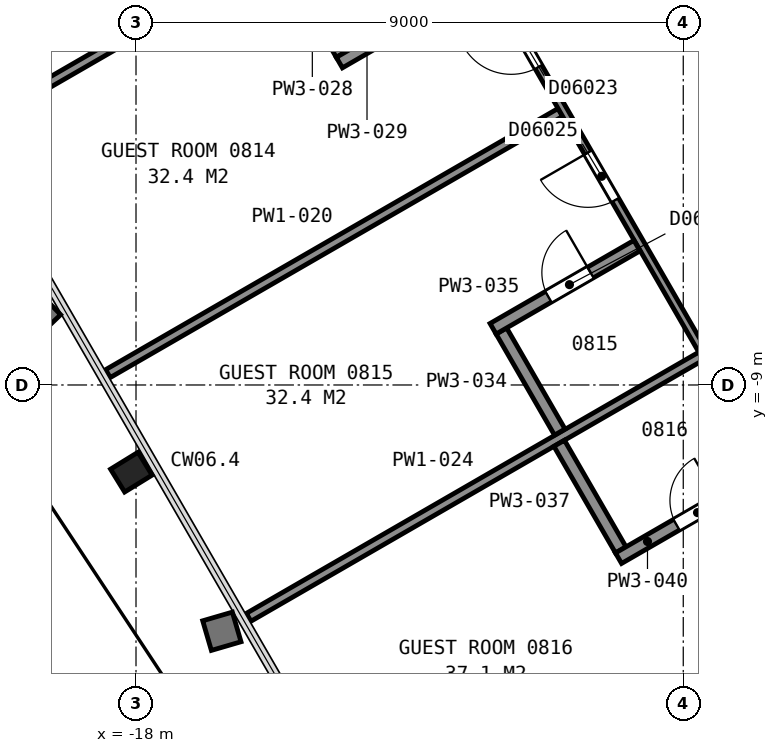
"""IFC4 building model, lengths in metres.
Left out: names, types, materials, properties, quantities, classifications, styles, units other than length and angle.
Written with IfcOpenShell. Run it as: python <this file> out.ifc"""

import sys

from ifc_helpers import new_model, si_unit, direction, frame, frame_2d, origin, origin_2d, place, context, subcontext, project, spatial, rectangle, i_section, extrude, element, fill, save


model = new_model("IFC4")
c1 = context("Model", 3, precision=1e-05, world=origin(), true_north=direction((0.0, 1.0)))
c2 = subcontext(c1, "Body", "Model", "MODEL_VIEW")
j1 = project(units=[si_unit("LENGTHUNIT", "METRE"), si_unit("PLANEANGLEUNIT", "RADIAN")], contexts=[c1])
p1 = place(None, origin())
s1 = spatial("IfcSite", under=j1, at=p1, CompositionType="ELEMENT")
p2 = place(p1, origin())
s2 = spatial("IfcBuilding", under=s1, at=p2, CompositionType="ELEMENT")
p3 = place(p2, frame((0.0, 0.0, 44.0)))
s3 = spatial("IfcBuildingStorey", under=s2, at=p3, CompositionType="ELEMENT", Elevation=44.0)
p4 = place(p3, frame((-17.992, -10.381, 0.025), z_axis=(-0.072019656871, -0.044267077392, 0.99642039064), x_axis=(-0.499538231107, 0.866288572712, 0.002380010802)))
e1 = element("IfcColumn", 1, at=p4, inside=s3, PredefinedType="COLUMN", context=c2, shape_type="SweptSolid", body=[
    extrude(i_section(OverallWidth=0.442, OverallDepth=0.531, WebThickness=0.066, FlangeThickness=0.106, FilletRadius=0.015, at=origin_2d()), origin(), (0.0, 0.0, 1.0), 3.563),
])
p5 = place(p3, frame((-13.664, 5.946, 0.0), z_axis=(0.0, 0.0, 1.0), x_axis=(0.499994327219, -0.866028678941, 0.0)))
e2 = element("IfcWall", 2, at=p5, inside=s3, PredefinedType="PARTITIONING", context=c2, shape_type="SweptSolid", body=[
    extrude(rectangle(XDim=23.968, YDim=0.2, at=frame_2d((11.984, 0.0))), origin(), (0.0, 0.0, 1.0), 3.35),
])
p6 = place(p3, frame((-20.775, -4.806, 0.0), z_axis=(0.0, 0.0, 1.0), x_axis=(0.865995804368, 0.50005126419, 0.0)))
e3 = element("IfcWall", 3, at=p6, inside=s3, PredefinedType="PARTITIONING", context=c2, shape_type="SweptSolid", body=[
    extrude(rectangle(XDim=8.591, YDim=0.15, at=frame_2d((4.295, 0.0))), origin(), (0.0, 0.0, 1.0), 2.613),
])
p7 = place(p3, frame((-18.462, -8.813, 0.0), z_axis=(0.0, 0.0, 1.0), x_axis=(0.866029425019, 0.499993034952, 0.0)))
e4 = element("IfcWall", 4, at=p7, inside=s3, PredefinedType="PARTITIONING", context=c2, shape_type="SweptSolid", body=[
    extrude(rectangle(XDim=8.591, YDim=0.15, at=frame_2d((4.296, 0.0))), origin(), (0.0, 0.0, 1.0), 2.613),
])
p8 = place(p3, frame((-3.766, -16.958, 0.0), z_axis=(0.0, 0.0, 1.0), x_axis=(-0.500024758804, 0.866011108811, 0.0)))
e5 = element("IfcWall", 5, at=p8, inside=s3, PredefinedType="PARTITIONING", context=c2, shape_type="SweptSolid", body=[
    extrude(rectangle(XDim=26.402, YDim=0.125, at=frame_2d((13.201, 0.0))), origin(), (0.0, 0.0, 1.0), 2.613),
])
p9 = place(p8, frame((25.139, 0.0, 0.0)))
e6 = element("IfcOpeningElement", 6, at=p9, cuts=e5, PredefinedType="OPENING", context=c2, shape_type="SweptSolid", body=[
    extrude(rectangle(XDim=0.9, YDim=2.1, at=frame_2d((0.45, 1.05))), frame((0.0, 0.073, 0.0), z_axis=(0.0, -1.0, 0.0), x_axis=(1.0, 0.0, 0.0)), (0.0, 0.0, 1.0), 0.145),
])
p10 = place(p8, frame((22.963, 0.0, 0.0)))
e7 = element("IfcOpeningElement", 7, at=p10, cuts=e5, PredefinedType="OPENING", context=c2, shape_type="SweptSolid", body=[
    extrude(rectangle(XDim=1.0, YDim=2.1, at=frame_2d((0.5, 1.05))), frame((0.0, 0.073, 0.0), z_axis=(0.0, -1.0, 0.0), x_axis=(1.0, 0.0, 0.0)), (0.0, 0.0, 1.0), 0.145),
])
p11 = place(p8, frame((15.228, 0.0, 0.0)))
e8 = element("IfcOpeningElement", 8, at=p11, cuts=e5, PredefinedType="OPENING", context=c2, shape_type="SweptSolid", body=[
    extrude(rectangle(XDim=0.9, YDim=2.1, at=frame_2d((0.45, 1.05))), frame((0.0, 0.073, 0.0), z_axis=(0.0, -1.0, 0.0), x_axis=(1.0, 0.0, 0.0)), (0.0, 0.0, 1.0), 0.145),
])
p12 = place(p8, frame((12.702, 0.0, 0.0)))
e9 = element("IfcOpeningElement", 9, at=p12, cuts=e5, PredefinedType="OPENING", context=c2, shape_type="SweptSolid", body=[
    extrude(rectangle(XDim=0.9, YDim=2.1, at=frame_2d((0.45, 1.05))), frame((0.0, 0.073, 0.0), z_axis=(0.0, -1.0, 0.0), x_axis=(1.0, 0.0, 0.0)), (0.0, 0.0, 1.0), 0.145),
])
p13 = place(p8, frame((5.624, 0.0, 0.0)))
e10 = element("IfcOpeningElement", 10, at=p13, cuts=e5, PredefinedType="OPENING", context=c2, shape_type="SweptSolid", body=[
    extrude(rectangle(XDim=0.9, YDim=2.1, at=frame_2d((0.45, 1.05))), frame((0.0, 0.073, 0.0), z_axis=(0.0, -1.0, 0.0), x_axis=(1.0, 0.0, 0.0)), (0.0, 0.0, 1.0), 0.145),
])
p14 = place(p8, frame((2.843, 0.0, 0.0)))
e11 = element("IfcOpeningElement", 11, at=p14, cuts=e5, PredefinedType="OPENING", context=c2, shape_type="SweptSolid", body=[
    extrude(rectangle(XDim=0.9, YDim=2.1, at=frame_2d((0.45, 1.05))), frame((0.0, 0.073, 0.0), z_axis=(0.0, -1.0, 0.0), x_axis=(1.0, 0.0, 0.0)), (0.0, 0.0, 1.0), 0.145),
])
p15 = place(p3, frame((-16.148, -12.821, 0.0), z_axis=(0.0, 0.0, 1.0), x_axis=(0.866036528751, 0.499980730498, 0.0)))
e12 = element("IfcWall", 12, at=p15, inside=s3, PredefinedType="PARTITIONING", context=c2, shape_type="SweptSolid", body=[
    extrude(rectangle(XDim=8.592, YDim=0.15, at=frame_2d((4.296, 0.0))), origin(), (0.0, 0.0, 1.0), 2.613),
])
p16 = place(p3, frame((-15.582, -1.894, 0.0), z_axis=(0.0, 0.0, 1.0), x_axis=(0.500026156197, -0.86601030197, 0.0)))
e13 = element("IfcWall", 13, at=p16, inside=s3, PredefinedType="PARTITIONING", context=c2, shape_type="SweptSolid", body=[
    extrude(rectangle(XDim=1.925, YDim=0.2, at=frame_2d((0.963, 0.0))), origin(), (0.0, 0.0, 1.0), 2.613),
])
p17 = place(p3, frame((-14.656, -3.698, 0.0), z_axis=(0.0, 0.0, 1.0), x_axis=(0.866005850709, 0.50003386539, 0.0)))
e14 = element("IfcWall", 14, at=p17, inside=s3, PredefinedType="PARTITIONING", context=c2, shape_type="SweptSolid", body=[
    extrude(rectangle(XDim=2.737, YDim=0.2, at=frame_2d((1.369, 0.0))), origin(), (0.0, 0.0, 1.0), 2.613),
])
p18 = place(p17, frame((1.05, 0.0, 0.0)))
e15 = element("IfcOpeningElement", 15, at=p18, cuts=e14, PredefinedType="OPENING", context=c2, shape_type="SweptSolid", body=[
    extrude(rectangle(XDim=0.8, YDim=2.1, at=frame_2d((0.4, 1.05))), frame((0.0, 0.11, 0.0), z_axis=(0.0, -1.0, 0.0), x_axis=(1.0, 0.0, 0.0)), (0.0, 0.0, 1.0), 0.22),
])
p19 = place(p3, frame((-13.532, -17.351, 0.0), z_axis=(0.0, 0.0, 1.0), x_axis=(0.866002910178, 0.500038958046, 0.0)))
e16 = element("IfcWall", 16, at=p19, inside=s3, PredefinedType="PARTITIONING", context=c2, shape_type="SweptSolid", body=[
    extrude(rectangle(XDim=8.591, YDim=0.15, at=frame_2d((4.295, 0.0))), origin(), (0.0, 0.0, 1.0), 2.613),
])
p20 = place(p3, frame((-11.991, -8.112, 0.0), z_axis=(0.0, 0.0, 1.0), x_axis=(0.499913221443, -0.866075499611, 0.0)))
e17 = element("IfcWall", 17, at=p20, inside=s3, PredefinedType="PARTITIONING", context=c2, shape_type="SweptSolid", body=[
    extrude(rectangle(XDim=1.92, YDim=0.2, at=frame_2d((0.96, 0.0))), origin(), (0.0, 0.0, 1.0), 2.613),
])
p21 = place(p3, frame((-9.761, -6.709, 0.0), z_axis=(0.0, 0.0, 1.0), x_axis=(-0.866012976267, -0.500021524473, 0.0)))
e18 = element("IfcWall", 18, at=p21, inside=s3, PredefinedType="PARTITIONING", context=c2, shape_type="SweptSolid", body=[
    extrude(rectangle(XDim=2.732, YDim=0.2, at=frame_2d((1.366, 0.0))), origin(), (0.0, 0.0, 1.0), 2.613),
])
p22 = place(p21, frame((0.882, 0.0, 0.0)))
e19 = element("IfcOpeningElement", 19, at=p22, cuts=e18, PredefinedType="OPENING", context=c2, shape_type="SweptSolid", body=[
    extrude(rectangle(XDim=0.8, YDim=2.1, at=frame_2d((0.4, 1.05))), frame((0.0, 0.11, 0.0), z_axis=(0.0, -1.0, 0.0), x_axis=(1.0, 0.0, 0.0)), (0.0, 0.0, 1.0), 0.22),
])
p23 = place(p3, frame((-11.041, -9.959, 0.0), z_axis=(0.0, 0.0, 1.0), x_axis=(0.500042536776, -0.866000843773, 0.0)))
e20 = element("IfcWall", 20, at=p23, inside=s3, PredefinedType="PARTITIONING", context=c2, shape_type="SweptSolid", body=[
    extrude(rectangle(XDim=2.025, YDim=0.2, at=frame_2d((1.012, 0.0))), origin(), (0.0, 0.0, 1.0), 2.613),
])
p24 = place(p3, frame((-10.065, -11.849, 0.0), z_axis=(0.0, 0.0, 1.0), x_axis=(0.866048046904, 0.499960778915, 0.0)))
e21 = element("IfcWall", 21, at=p24, inside=s3, PredefinedType="PARTITIONING", context=c2, shape_type="SweptSolid", body=[
    extrude(rectangle(XDim=2.838, YDim=0.2, at=frame_2d((1.419, 0.0))), origin(), (0.0, 0.0, 1.0), 2.613),
])
p25 = place(p24, frame((1.1, 0.0, 0.0)))
e22 = element("IfcOpeningElement", 22, at=p25, cuts=e21, PredefinedType="OPENING", context=c2, shape_type="SweptSolid", body=[
    extrude(rectangle(XDim=0.8, YDim=2.1, at=frame_2d((0.4, 1.05))), frame((0.0, 0.11, 0.0), z_axis=(0.0, -1.0, 0.0), x_axis=(1.0, 0.0, 0.0)), (0.0, 0.0, 1.0), 0.22),
])
p26 = place(p11, origin())
e23 = element("IfcDoor", 23, at=p26, inside=s3, OperationType="SINGLE_SWING_RIGHT", PredefinedType="DOOR", context=c2, shape_type="SweptSolid", body=[
    extrude(rectangle(XDim=0.9, YDim=2.1, at=frame_2d((0.45, 1.05))), frame((0.0, 0.025, 0.0), z_axis=(0.0, -1.0, 0.0), x_axis=(1.0, 0.0, 0.0)), (0.0, 0.0, 1.0), 0.05),
])
fill(e8, e23)
p27 = place(p12, origin())
e24 = element("IfcDoor", 24, at=p27, inside=s3, OperationType="SINGLE_SWING_RIGHT", PredefinedType="DOOR", context=c2, shape_type="SweptSolid", body=[
    extrude(rectangle(XDim=0.9, YDim=2.1, at=frame_2d((0.45, 1.05))), frame((0.0, 0.025, 0.0), z_axis=(0.0, -1.0, 0.0), x_axis=(1.0, 0.0, 0.0)), (0.0, 0.0, 1.0), 0.05),
])
fill(e9, e24)
p28 = place(p22, origin())
e25 = element("IfcDoor", 25, at=p28, inside=s3, OperationType="SINGLE_SWING_LEFT", PredefinedType="DOOR", context=c2, shape_type="SweptSolid", body=[
    extrude(rectangle(XDim=0.8, YDim=2.1, at=frame_2d((0.4, 1.05))), frame((0.0, 0.025, 0.0), z_axis=(0.0, -1.0, 0.0), x_axis=(1.0, 0.0, 0.0)), (0.0, 0.0, 1.0), 0.05),
])
fill(e19, e25)
p29 = place(p25, origin())
e26 = element("IfcDoor", 26, at=p29, inside=s3, OperationType="SINGLE_SWING_RIGHT", PredefinedType="DOOR", context=c2, shape_type="SweptSolid", body=[
    extrude(rectangle(XDim=0.8, YDim=2.1, at=frame_2d((0.4, 1.05))), frame((0.0, 0.025, 0.0), z_axis=(0.0, -1.0, 0.0), x_axis=(1.0, 0.0, 0.0)), (0.0, 0.0, 1.0), 0.05),
])
fill(e22, e26)
save(model, sys.argv[1])
